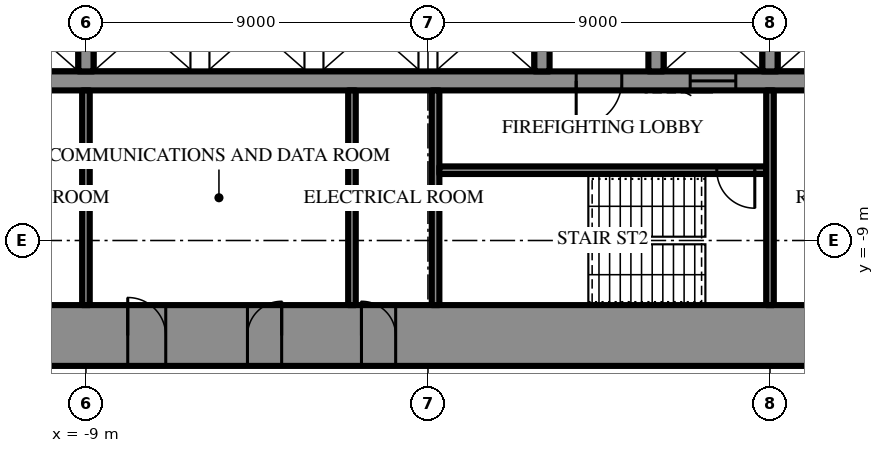
"""IFC4 building model, lengths in metres.
Left out: names, types, materials, properties, quantities, classifications, styles, units other than length and angle.
Written with IfcOpenShell. Run it as: python <this file> out.ifc"""

import sys

from ifc_helpers import new_model, si_unit, direction, frame, frame_2d, origin, place, context, subcontext, project, spatial, rectangle, extrude, element, fill, save


model = new_model("IFC4")
c1 = context("Model", 3, precision=1e-05, world=origin(), true_north=direction((0.0, 1.0)))
c2 = subcontext(c1, "Body", "Model", "MODEL_VIEW")
j1 = project(units=[si_unit("LENGTHUNIT", "METRE"), si_unit("PLANEANGLEUNIT", "RADIAN")], contexts=[c1])
p1 = place(None, origin())
s1 = spatial("IfcSite", under=j1, at=p1, CompositionType="ELEMENT")
p2 = place(p1, origin())
s2 = spatial("IfcBuilding", under=s1, at=p2, CompositionType="ELEMENT")
p3 = place(p2, frame((0.0, 0.0, 249.1)))
s3 = spatial("IfcBuildingStorey", under=s2, at=p3, CompositionType="ELEMENT", Elevation=249.1)
p4 = place(p3, frame((15.5, -11.5, 0.0), z_axis=(0.0, 0.0, 1.0), x_axis=(-1.0, 0.0, 0.0)))
e1 = element("IfcWall", 1, at=p4, inside=s3, PredefinedType="SHEAR", context=c2, shape_type="SweptSolid", body=[
    extrude(rectangle(XDim=31.0, YDim=1.6, at=frame_2d((15.5, 0.0))), origin(), (0.0, 0.0, 1.0), 4.2),
])
p5 = place(p4, frame((16.35, 0.0, 0.0)))
e2 = element("IfcOpeningElement", 2, at=p5, cuts=e1, PredefinedType="OPENING", context=c2, shape_type="SweptSolid", body=[
    extrude(rectangle(XDim=0.9, YDim=2.2, at=frame_2d((0.45, 1.1))), frame((0.0, 0.81, 0.0), z_axis=(0.0, -1.0, 0.0), x_axis=(1.0, 0.0, 0.0)), (0.0, 0.0, 1.0), 1.62),
])
p6 = place(p4, frame((19.35, 0.0, 0.0)))
e3 = element("IfcOpeningElement", 3, at=p6, cuts=e1, PredefinedType="OPENING", context=c2, shape_type="SweptSolid", body=[
    extrude(rectangle(XDim=0.9, YDim=2.2, at=frame_2d((0.45, 1.1))), frame((0.0, 0.81, 0.0), z_axis=(0.0, -1.0, 0.0), x_axis=(1.0, 0.0, 0.0)), (0.0, 0.0, 1.0), 1.62),
])
p7 = place(p4, frame((22.4, 0.0, 0.0)))
e4 = element("IfcOpeningElement", 4, at=p7, cuts=e1, PredefinedType="OPENING", context=c2, shape_type="SweptSolid", body=[
    extrude(rectangle(XDim=1.0, YDim=2.2, at=frame_2d((0.5, 1.1))), frame((0.0, 0.81, 0.0), z_axis=(0.0, -1.0, 0.0), x_axis=(1.0, 0.0, 0.0)), (0.0, 0.0, 1.0), 1.62),
])
p8 = place(p4, frame((1.65, 0.0, 0.0)))
e5 = element("IfcOpeningElement", 5, at=p8, cuts=e1, PredefinedType="OPENING", context=c2, shape_type="SweptSolid", body=[
    extrude(rectangle(XDim=0.9, YDim=2.2, at=frame_2d((0.45, 1.1))), frame((0.0, 0.81, 0.0), z_axis=(0.0, -1.0, 0.0), x_axis=(1.0, 0.0, 0.0)), (0.0, 0.0, 1.0), 1.62),
])
p9 = place(p4, frame((4.65, 0.0, 0.0)))
e6 = element("IfcOpeningElement", 6, at=p9, cuts=e1, PredefinedType="OPENING", context=c2, shape_type="SweptSolid", body=[
    extrude(rectangle(XDim=0.9, YDim=2.2, at=frame_2d((0.45, 1.1))), frame((0.0, 0.81, 0.0), z_axis=(0.0, -1.0, 0.0), x_axis=(1.0, 0.0, 0.0)), (0.0, 0.0, 1.0), 1.62),
])
p10 = place(p4, frame((25.45, 0.0, 0.0)))
e7 = element("IfcOpeningElement", 7, at=p10, cuts=e1, PredefinedType="OPENING", context=c2, shape_type="SweptSolid", body=[
    extrude(rectangle(XDim=0.9, YDim=2.2, at=frame_2d((0.45, 1.1))), frame((0.0, 0.81, 0.0), z_axis=(0.0, -1.0, 0.0), x_axis=(1.0, 0.0, 0.0)), (0.0, 0.0, 1.0), 1.62),
])
p11 = place(p4, frame((28.45, 0.0, 0.0)))
e8 = element("IfcOpeningElement", 8, at=p11, cuts=e1, PredefinedType="OPENING", context=c2, shape_type="SweptSolid", body=[
    extrude(rectangle(XDim=0.9, YDim=2.2, at=frame_2d((0.45, 1.1))), frame((0.0, 0.81, 0.0), z_axis=(0.0, -1.0, 0.0), x_axis=(1.0, 0.0, 0.0)), (0.0, 0.0, 1.0), 1.62),
])
p12 = place(p3, frame((11.7, -4.8, 0.0), z_axis=(0.0, 0.0, 1.0), x_axis=(-1.0, 0.0, 0.0)))
e9 = element("IfcWall", 9, at=p12, inside=s3, PredefinedType="SHEAR", context=c2, shape_type="SweptSolid", body=[
    extrude(rectangle(XDim=23.4, YDim=0.5, at=frame_2d((11.7, 0.0))), origin(), (0.0, 0.0, 1.0), 4.2),
])
p13 = place(p12, frame((6.6, 0.0, 0.0)))
e10 = element("IfcOpeningElement", 10, at=p13, cuts=e9, PredefinedType="OPENING", context=c2, shape_type="SweptSolid", body=[
    extrude(rectangle(XDim=1.2, YDim=2.2, at=frame_2d((0.6, 1.1))), frame((0.0, 0.26, 0.0), z_axis=(0.0, -1.0, 0.0), x_axis=(1.0, 0.0, 0.0)), (0.0, 0.0, 1.0), 0.52),
])
p14 = place(p12, frame((3.6, 0.0, 0.0)))
e11 = element("IfcOpeningElement", 11, at=p14, cuts=e9, PredefinedType="OPENING", context=c2, shape_type="SweptSolid", body=[
    extrude(rectangle(XDim=1.2, YDim=2.2, at=frame_2d((0.6, 1.1))), frame((0.0, 0.26, 0.0), z_axis=(0.0, -1.0, 0.0), x_axis=(1.0, 0.0, 0.0)), (0.0, 0.0, 1.0), 0.52),
])
for number, where, z_axis, x_axis in (
    (12, (9.0, -2.25, 0.0), (0.0, 0.0, 1.0), (0.0, -1.0, 0.0)),
    (13, (6.0, -2.25, 0.0), (0.0, 0.0, 1.0), (0.0, -1.0, 0.0)),
    (14, (3.0, -2.25, 0.0), (0.0, 0.0, 1.0), (0.0, -1.0, 0.0)),
    (15, (-9.0, -2.25, 0.0), (0.0, 0.0, 1.0), (0.0, -1.0, 0.0)),
):
    element("IfcWall", number, at=place(p3, frame(where, z_axis=z_axis, x_axis=x_axis)), inside=s3, PredefinedType="SHEAR", context=c2, shape_type="SweptSolid", body=[
        extrude(rectangle(XDim=2.3, YDim=0.4, at=frame_2d((1.15, 0.0))), origin(), (0.0, 0.0, 1.0), 4.2),
    ])
p15 = place(p3, frame((0.2, -5.05, 0.0), z_axis=(0.0, 0.0, 1.0), x_axis=(0.0, -1.0, 0.0)))
e16 = element("IfcWall", 16, at=p15, inside=s3, PredefinedType="SHEAR", context=c2, shape_type="SweptSolid", body=[
    extrude(rectangle(XDim=5.65, YDim=0.2, at=frame_2d((2.825, 0.0))), origin(), (0.0, 0.0, 1.0), 4.2),
])
p16 = place(p3, frame((8.9, -7.15, 0.0), z_axis=(0.0, 0.0, 1.0), x_axis=(-1.0, 0.0, 0.0)))
e17 = element("IfcWall", 17, at=p16, inside=s3, PredefinedType="SHEAR", context=c2, shape_type="SweptSolid", body=[
    extrude(rectangle(XDim=8.6, YDim=0.2, at=frame_2d((4.3, 0.0))), origin(), (0.0, 0.0, 1.0), 4.2),
])
p17 = place(p16, frame((0.3, 0.0, 0.0)))
e18 = element("IfcOpeningElement", 18, at=p17, cuts=e17, PredefinedType="OPENING", context=c2, shape_type="SweptSolid", body=[
    extrude(rectangle(XDim=1.0, YDim=2.2, at=frame_2d((0.5, 1.1))), frame((0.0, 0.11, 0.0), z_axis=(0.0, -1.0, 0.0), x_axis=(1.0, 0.0, 0.0)), (0.0, 0.0, 1.0), 0.22),
])
for number, where, z_axis, x_axis in (
    (19, (9.0, -5.05, 0.0), (0.0, 0.0, 1.0), (0.0, -1.0, 0.0)),
    (20, (-9.0, -5.05, 0.0), (0.0, 0.0, 1.0), (0.0, -1.0, 0.0)),
    (21, (-2.0, -5.05, 0.0), (0.0, 0.0, 1.0), (0.0, -1.0, 0.0)),
):
    element("IfcWall", number, at=place(p3, frame(where, z_axis=z_axis, x_axis=x_axis)), inside=s3, PredefinedType="PARTITIONING", context=c2, shape_type="SweptSolid", body=[
        extrude(rectangle(XDim=5.65, YDim=0.2, at=frame_2d((2.825, 0.0))), origin(), (0.0, 0.0, 1.0), 4.0),
    ])
p18 = place(p13, origin())
e22 = element("IfcDoor", 22, at=p18, inside=s3, OperationType="SINGLE_SWING_LEFT", PredefinedType="DOOR", context=c2, shape_type="SweptSolid", body=[
    extrude(rectangle(XDim=1.2, YDim=2.2, at=frame_2d((0.6, 1.1))), frame((0.0, 0.025, 0.0), z_axis=(0.0, -1.0, 0.0), x_axis=(1.0, 0.0, 0.0)), (0.0, 0.0, 1.0), 0.05),
])
fill(e10, e22)
p19 = place(p17, origin())
e23 = element("IfcDoor", 23, at=p19, inside=s3, OperationType="SINGLE_SWING_RIGHT", PredefinedType="DOOR", context=c2, shape_type="SweptSolid", body=[
    extrude(rectangle(XDim=1.0, YDim=2.2, at=frame_2d((0.5, 1.1))), frame((0.0, 0.025, 0.0), z_axis=(0.0, -1.0, 0.0), x_axis=(1.0, 0.0, 0.0)), (0.0, 0.0, 1.0), 0.05),
])
fill(e18, e23)
p20 = place(p5, frame((0.9, 0.0, 0.0), z_axis=(0.0, 0.0, 1.0), x_axis=(-1.0, 0.0, 0.0)))
e24 = element("IfcDoor", 24, at=p20, inside=s3, OperationType="SINGLE_SWING_RIGHT", PredefinedType="DOOR", context=c2, shape_type="SweptSolid", body=[
    extrude(rectangle(XDim=0.9, YDim=2.2, at=frame_2d((0.45, 1.1))), frame((0.0, 0.025, 0.0), z_axis=(0.0, -1.0, 0.0), x_axis=(1.0, 0.0, 0.0)), (0.0, 0.0, 1.0), 0.05),
])
fill(e2, e24)
p21 = place(p6, frame((0.9, 0.0, 0.0), z_axis=(0.0, 0.0, 1.0), x_axis=(-1.0, 0.0, 0.0)))
e25 = element("IfcDoor", 25, at=p21, inside=s3, OperationType="SINGLE_SWING_LEFT", PredefinedType="DOOR", context=c2, shape_type="SweptSolid", body=[
    extrude(rectangle(XDim=0.9, YDim=2.2, at=frame_2d((0.45, 1.1))), frame((0.0, 0.025, 0.0), z_axis=(0.0, -1.0, 0.0), x_axis=(1.0, 0.0, 0.0)), (0.0, 0.0, 1.0), 0.05),
])
fill(e3, e25)
p22 = place(p7, frame((1.0, 0.0, 0.0), z_axis=(0.0, 0.0, 1.0), x_axis=(-1.0, 0.0, 0.0)))
e26 = element("IfcDoor", 26, at=p22, inside=s3, OperationType="SINGLE_SWING_RIGHT", PredefinedType="DOOR", context=c2, shape_type="SweptSolid", body=[
    extrude(rectangle(XDim=1.0, YDim=2.2, at=frame_2d((0.5, 1.1))), frame((0.0, 0.025, 0.0), z_axis=(0.0, -1.0, 0.0), x_axis=(1.0, 0.0, 0.0)), (0.0, 0.0, 1.0), 0.05),
])
fill(e4, e26)
p23 = place(p14, origin())
e27 = element("IfcDoor", 27, at=p23, inside=s3, OperationType="SLIDING_TO_LEFT", PredefinedType="DOOR", context=c2, shape_type="SweptSolid", body=[
    extrude(rectangle(XDim=1.2, YDim=2.2, at=frame_2d((0.6, 1.1))), frame((0.0, 0.025, 0.0), z_axis=(0.0, -1.0, 0.0), x_axis=(1.0, 0.0, 0.0)), (0.0, 0.0, 1.0), 0.05),
])
fill(e11, e27)
save(model, sys.argv[1])
